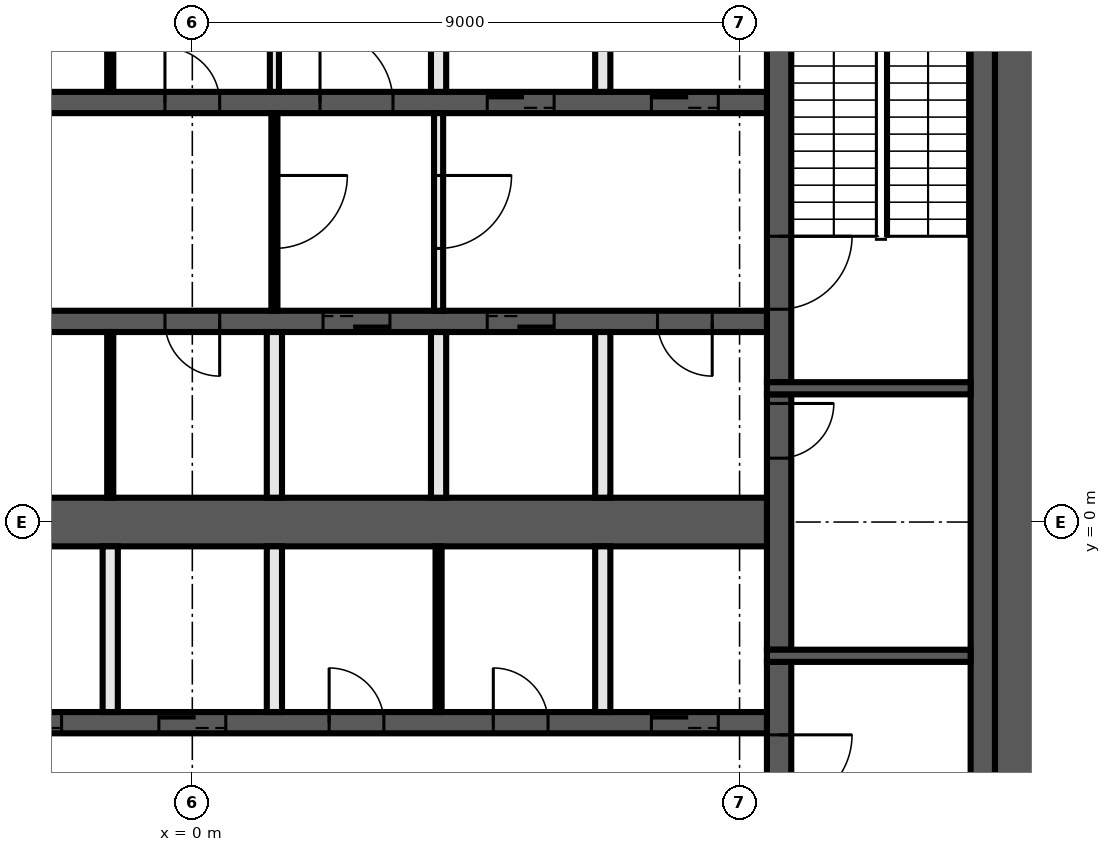
"""IFC4 building model, lengths in metres.
Left out: names, types, materials, properties, quantities, classifications, styles, units other than length and angle.
Written with IfcOpenShell. Run it as: python <this file> out.ifc"""

import sys

from ifc_helpers import new_model, si_unit, direction, frame, frame_2d, origin, place, context, subcontext, project, spatial, rectangle, extrude, element, fill, save


model = new_model("IFC4")
c1 = context("Model", 3, precision=1e-05, world=origin(), true_north=direction((0.0, 1.0)))
c2 = subcontext(c1, "Body", "Model", "MODEL_VIEW")
j1 = project(units=[si_unit("LENGTHUNIT", "METRE"), si_unit("PLANEANGLEUNIT", "RADIAN")], contexts=[c1])
p1 = place(None, origin())
s1 = spatial("IfcSite", under=j1, at=p1, CompositionType="ELEMENT")
p2 = place(p1, origin())
s2 = spatial("IfcBuilding", under=s1, at=p2, CompositionType="ELEMENT")
p3 = place(p2, frame((0.0, 0.0, 175.4)))
s3 = spatial("IfcBuildingStorey", under=s2, at=p3, CompositionType="ELEMENT", Elevation=175.4)
p4 = place(p3, frame((13.6, 10.2, 0.0), z_axis=(0.0, 0.0, 1.0), x_axis=(0.0, -1.0, 0.0)))
e1 = element("IfcWall", 1, at=p4, inside=s3, PredefinedType="SHEAR", context=c2, shape_type="SweptSolid", body=[
    extrude(rectangle(XDim=20.4, YDim=0.8, at=frame_2d((10.2, 0.0))), origin(), (0.0, 0.0, 1.0), 3.82),
])
p5 = place(p3, frame((13.0, 9.8, 0.0), z_axis=(0.0, 0.0, 1.0), x_axis=(0.0, -1.0, 0.0)))
e2 = element("IfcWall", 2, at=p5, inside=s3, PredefinedType="SHEAR", context=c2, shape_type="SweptSolid", body=[
    extrude(rectangle(XDim=19.6, YDim=0.4, at=frame_2d((9.8, 0.0))), origin(), (0.0, 0.0, 1.0), 3.82),
])
p6 = place(p3, frame((9.65, -2.3, 0.0), z_axis=(0.0, 0.0, 1.0), x_axis=(0.0, -1.0, 0.0)))
e3 = element("IfcWall", 3, at=p6, inside=s3, PredefinedType="SHEAR", context=c2, shape_type="SweptSolid", body=[
    extrude(rectangle(XDim=7.5, YDim=0.4, at=frame_2d((3.75, 0.0))), origin(), (0.0, 0.0, 1.0), 3.82),
])
p7 = place(p6, frame((1.2, 0.0, 0.0)))
e4 = element("IfcOpeningElement", 4, at=p7, cuts=e3, PredefinedType="OPENING", context=c2, shape_type="SweptSolid", body=[
    extrude(rectangle(XDim=1.2, YDim=2.1, at=frame_2d((0.6, 1.05))), frame((0.0, 0.21, 0.0), z_axis=(0.0, -1.0, 0.0), x_axis=(1.0, 0.0, 0.0)), (0.0, 0.0, 1.0), 0.42),
])
p8 = place(p3, frame((9.65, 2.1, 0.0), z_axis=(0.0, 0.0, 1.0), x_axis=(0.0, -1.0, 0.0)))
e5 = element("IfcWall", 5, at=p8, inside=s3, PredefinedType="SHEAR", context=c2, shape_type="SweptSolid", body=[
    extrude(rectangle(XDim=4.2, YDim=0.4, at=frame_2d((2.1, 0.0))), origin(), (0.0, 0.0, 1.0), 3.82),
])
p9 = place(p8, frame((0.15, 0.0, 0.0)))
e6 = element("IfcOpeningElement", 6, at=p9, cuts=e5, PredefinedType="OPENING", context=c2, shape_type="SweptSolid", body=[
    extrude(rectangle(XDim=0.9, YDim=2.1, at=frame_2d((0.45, 1.05))), frame((0.0, 0.21, 0.0), z_axis=(0.0, -1.0, 0.0), x_axis=(1.0, 0.0, 0.0)), (0.0, 0.0, 1.0), 0.42),
])
p10 = place(p3, frame((9.65, 9.8, 0.0), z_axis=(0.0, 0.0, 1.0), x_axis=(0.0, -1.0, 0.0)))
e7 = element("IfcWall", 7, at=p10, inside=s3, PredefinedType="SHEAR", context=c2, shape_type="SweptSolid", body=[
    extrude(rectangle(XDim=7.5, YDim=0.4, at=frame_2d((3.75, 0.0))), origin(), (0.0, 0.0, 1.0), 3.82),
])
p11 = place(p10, frame((5.1, 0.0, 0.0)))
e8 = element("IfcOpeningElement", 8, at=p11, cuts=e7, PredefinedType="OPENING", context=c2, shape_type="SweptSolid", body=[
    extrude(rectangle(XDim=1.2, YDim=2.1, at=frame_2d((0.6, 1.05))), frame((0.0, 0.21, 0.0), z_axis=(0.0, -1.0, 0.0), x_axis=(1.0, 0.0, 0.0)), (0.0, 0.0, 1.0), 0.42),
])
for number, where, z_axis, x_axis in (
    (9, (9.45, 2.2, 0.0), (0.0, 0.0, 1.0), (1.0, 0.0, 0.0)),
    (10, (9.45, -2.2, 0.0), (0.0, 0.0, 1.0), (1.0, 0.0, 0.0)),
):
    element("IfcWall", number, at=place(p3, frame(where, z_axis=z_axis, x_axis=x_axis)), inside=s3, PredefinedType="SHEAR", context=c2, shape_type="SweptSolid", body=[
        extrude(rectangle(XDim=3.35, YDim=0.2, at=frame_2d((1.675, 0.0))), origin(), (0.0, 0.0, 1.0), 3.82),
    ])
p12 = place(p3, frame((-9.45, 6.9, 0.0), z_axis=(0.0, 0.0, 1.0), x_axis=(1.0, 0.0, 0.0)))
e11 = element("IfcWall", 11, at=p12, inside=s3, PredefinedType="SHEAR", context=c2, shape_type="SweptSolid", body=[
    extrude(rectangle(XDim=18.9, YDim=0.35, at=frame_2d((9.45, 0.0))), origin(), (0.0, 0.0, 1.0), 3.82),
])
p13 = place(p12, frame((11.55, 0.0, 0.0)))
e12 = element("IfcOpeningElement", 12, at=p13, cuts=e11, PredefinedType="OPENING", context=c2, shape_type="SweptSolid", body=[
    extrude(rectangle(XDim=1.2, YDim=2.1, at=frame_2d((0.6, 1.05))), frame((0.0, 0.185, 0.0), z_axis=(0.0, -1.0, 0.0), x_axis=(1.0, 0.0, 0.0)), (0.0, 0.0, 1.0), 0.37),
])
p14 = place(p12, frame((14.3, 0.0, 0.0)))
e13 = element("IfcOpeningElement", 13, at=p14, cuts=e11, PredefinedType="OPENING", context=c2, shape_type="SweptSolid", body=[
    extrude(rectangle(XDim=1.1, YDim=2.1, at=frame_2d((0.55, 1.05))), frame((0.0, 0.185, 0.0), z_axis=(0.0, -1.0, 0.0), x_axis=(1.0, 0.0, 0.0)), (0.0, 0.0, 1.0), 0.37),
])
p15 = place(p12, frame((17.0, 0.0, 0.0)))
e14 = element("IfcOpeningElement", 14, at=p15, cuts=e11, PredefinedType="OPENING", context=c2, shape_type="SweptSolid", body=[
    extrude(rectangle(XDim=1.1, YDim=2.1, at=frame_2d((0.55, 1.05))), frame((0.0, 0.185, 0.0), z_axis=(0.0, -1.0, 0.0), x_axis=(1.0, 0.0, 0.0)), (0.0, 0.0, 1.0), 0.37),
])
p16 = place(p12, frame((3.6, 0.0, 0.0)))
e15 = element("IfcOpeningElement", 15, at=p16, cuts=e11, PredefinedType="OPENING", context=c2, shape_type="SweptSolid", body=[
    extrude(rectangle(XDim=0.9, YDim=2.1, at=frame_2d((0.45, 1.05))), frame((0.0, 0.185, 0.0), z_axis=(0.0, -1.0, 0.0), x_axis=(1.0, 0.0, 0.0)), (0.0, 0.0, 1.0), 0.37),
])
p17 = place(p12, frame((9.0, 0.0, 0.0)))
e16 = element("IfcOpeningElement", 16, at=p17, cuts=e11, PredefinedType="OPENING", context=c2, shape_type="SweptSolid", body=[
    extrude(rectangle(XDim=0.9, YDim=2.1, at=frame_2d((0.45, 1.05))), frame((0.0, 0.185, 0.0), z_axis=(0.0, -1.0, 0.0), x_axis=(1.0, 0.0, 0.0)), (0.0, 0.0, 1.0), 0.37),
])
p18 = place(p3, frame((9.45, 3.3, 0.0), z_axis=(0.0, 0.0, 1.0), x_axis=(-1.0, 0.0, 0.0)))
e17 = element("IfcWall", 17, at=p18, inside=s3, PredefinedType="SHEAR", context=c2, shape_type="SweptSolid", body=[
    extrude(rectangle(XDim=18.9, YDim=0.35, at=frame_2d((9.45, 0.0))), origin(), (0.0, 0.0, 1.0), 3.82),
])
p19 = place(p18, frame((6.2, 0.0, 0.0)))
e18 = element("IfcOpeningElement", 18, at=p19, cuts=e17, PredefinedType="OPENING", context=c2, shape_type="SweptSolid", body=[
    extrude(rectangle(XDim=1.1, YDim=2.1, at=frame_2d((0.55, 1.05))), frame((0.0, 0.185, 0.0), z_axis=(0.0, -1.0, 0.0), x_axis=(1.0, 0.0, 0.0)), (0.0, 0.0, 1.0), 0.37),
])
p20 = place(p18, frame((3.5, 0.0, 0.0)))
e19 = element("IfcOpeningElement", 19, at=p20, cuts=e17, PredefinedType="OPENING", context=c2, shape_type="SweptSolid", body=[
    extrude(rectangle(XDim=1.1, YDim=2.1, at=frame_2d((0.55, 1.05))), frame((0.0, 0.185, 0.0), z_axis=(0.0, -1.0, 0.0), x_axis=(1.0, 0.0, 0.0)), (0.0, 0.0, 1.0), 0.37),
])
p21 = place(p18, frame((0.9, 0.0, 0.0)))
e20 = element("IfcOpeningElement", 20, at=p21, cuts=e17, PredefinedType="OPENING", context=c2, shape_type="SweptSolid", body=[
    extrude(rectangle(XDim=0.9, YDim=2.1, at=frame_2d((0.45, 1.05))), frame((0.0, 0.185, 0.0), z_axis=(0.0, -1.0, 0.0), x_axis=(1.0, 0.0, 0.0)), (0.0, 0.0, 1.0), 0.37),
])
p22 = place(p18, frame((14.4, 0.0, 0.0)))
e21 = element("IfcOpeningElement", 21, at=p22, cuts=e17, PredefinedType="OPENING", context=c2, shape_type="SweptSolid", body=[
    extrude(rectangle(XDim=0.9, YDim=2.1, at=frame_2d((0.45, 1.05))), frame((0.0, 0.185, 0.0), z_axis=(0.0, -1.0, 0.0), x_axis=(1.0, 0.0, 0.0)), (0.0, 0.0, 1.0), 0.37),
])
p23 = place(p18, frame((9.0, 0.0, 0.0)))
e22 = element("IfcOpeningElement", 22, at=p23, cuts=e17, PredefinedType="OPENING", context=c2, shape_type="SweptSolid", body=[
    extrude(rectangle(XDim=0.9, YDim=2.1, at=frame_2d((0.45, 1.05))), frame((0.0, 0.185, 0.0), z_axis=(0.0, -1.0, 0.0), x_axis=(1.0, 0.0, 0.0)), (0.0, 0.0, 1.0), 0.37),
])
p24 = place(p3, frame((-9.45, -3.3, 0.0), z_axis=(0.0, 0.0, 1.0), x_axis=(1.0, 0.0, 0.0)))
e23 = element("IfcWall", 23, at=p24, inside=s3, PredefinedType="SHEAR", context=c2, shape_type="SweptSolid", body=[
    extrude(rectangle(XDim=18.9, YDim=0.35, at=frame_2d((9.45, 0.0))), origin(), (0.0, 0.0, 1.0), 3.82),
])
p25 = place(p24, frame((0.8, 0.0, 0.0)))
e24 = element("IfcOpeningElement", 24, at=p25, cuts=e23, PredefinedType="OPENING", context=c2, shape_type="SweptSolid", body=[
    extrude(rectangle(XDim=1.1, YDim=2.1, at=frame_2d((0.55, 1.05))), frame((0.0, 0.185, 0.0), z_axis=(0.0, -1.0, 0.0), x_axis=(1.0, 0.0, 0.0)), (0.0, 0.0, 1.0), 0.37),
])
p26 = place(p24, frame((3.5, 0.0, 0.0)))
e25 = element("IfcOpeningElement", 25, at=p26, cuts=e23, PredefinedType="OPENING", context=c2, shape_type="SweptSolid", body=[
    extrude(rectangle(XDim=1.1, YDim=2.1, at=frame_2d((0.55, 1.05))), frame((0.0, 0.185, 0.0), z_axis=(0.0, -1.0, 0.0), x_axis=(1.0, 0.0, 0.0)), (0.0, 0.0, 1.0), 0.37),
])
p27 = place(p24, frame((6.2, 0.0, 0.0)))
e26 = element("IfcOpeningElement", 26, at=p27, cuts=e23, PredefinedType="OPENING", context=c2, shape_type="SweptSolid", body=[
    extrude(rectangle(XDim=1.1, YDim=2.1, at=frame_2d((0.55, 1.05))), frame((0.0, 0.185, 0.0), z_axis=(0.0, -1.0, 0.0), x_axis=(1.0, 0.0, 0.0)), (0.0, 0.0, 1.0), 0.37),
])
p28 = place(p24, frame((8.9, 0.0, 0.0)))
e27 = element("IfcOpeningElement", 27, at=p28, cuts=e23, PredefinedType="OPENING", context=c2, shape_type="SweptSolid", body=[
    extrude(rectangle(XDim=1.1, YDim=2.1, at=frame_2d((0.55, 1.05))), frame((0.0, 0.185, 0.0), z_axis=(0.0, -1.0, 0.0), x_axis=(1.0, 0.0, 0.0)), (0.0, 0.0, 1.0), 0.37),
])
p29 = place(p24, frame((17.0, 0.0, 0.0)))
e28 = element("IfcOpeningElement", 28, at=p29, cuts=e23, PredefinedType="OPENING", context=c2, shape_type="SweptSolid", body=[
    extrude(rectangle(XDim=1.1, YDim=2.1, at=frame_2d((0.55, 1.05))), frame((0.0, 0.185, 0.0), z_axis=(0.0, -1.0, 0.0), x_axis=(1.0, 0.0, 0.0)), (0.0, 0.0, 1.0), 0.37),
])
p30 = place(p24, frame((11.7, 0.0, 0.0)))
e29 = element("IfcOpeningElement", 29, at=p30, cuts=e23, PredefinedType="OPENING", context=c2, shape_type="SweptSolid", body=[
    extrude(rectangle(XDim=0.9, YDim=2.1, at=frame_2d((0.45, 1.05))), frame((0.0, 0.185, 0.0), z_axis=(0.0, -1.0, 0.0), x_axis=(1.0, 0.0, 0.0)), (0.0, 0.0, 1.0), 0.37),
])
p31 = place(p24, frame((14.4, 0.0, 0.0)))
e30 = element("IfcOpeningElement", 30, at=p31, cuts=e23, PredefinedType="OPENING", context=c2, shape_type="SweptSolid", body=[
    extrude(rectangle(XDim=0.9, YDim=2.1, at=frame_2d((0.45, 1.05))), frame((0.0, 0.185, 0.0), z_axis=(0.0, -1.0, 0.0), x_axis=(1.0, 0.0, 0.0)), (0.0, 0.0, 1.0), 0.37),
])
p32 = place(p3, frame((-9.45, 0.0, 0.0), z_axis=(0.0, 0.0, 1.0), x_axis=(1.0, 0.0, 0.0)))
e31 = element("IfcWall", 31, at=p32, inside=s3, PredefinedType="SHEAR", context=c2, shape_type="SweptSolid", body=[
    extrude(rectangle(XDim=18.9, YDim=0.8, at=frame_2d((9.45, 0.0))), origin(), (0.0, 0.0, 1.0), 3.82),
])
for number, where, z_axis, x_axis in (
    (32, (6.75, -3.125, 0.0), (0.0, 0.0, 1.0), (0.0, 1.0, 0.0)),
    (33, (6.75, 0.4, 0.0), (0.0, 0.0, 1.0), (0.0, 1.0, 0.0)),
    (34, (6.75, 7.075, 0.0), (0.0, 0.0, 1.0), (0.0, 1.0, 0.0)),
):
    element("IfcWall", number, at=place(p3, frame(where, z_axis=z_axis, x_axis=x_axis)), inside=s3, PredefinedType="SOLIDWALL", context=c2, shape_type="SweptSolid", body=[
        extrude(rectangle(XDim=2.725, YDim=0.25, at=frame_2d((1.363, 0.0))), origin(), (0.0, 0.0, 1.0), 3.82),
    ])
p33 = place(p3, frame((4.05, 6.725, 0.0), z_axis=(0.0, 0.0, 1.0), x_axis=(0.0, -1.0, 0.0)))
e35 = element("IfcWall", 35, at=p33, inside=s3, PredefinedType="PARTITIONING", context=c2, shape_type="SweptSolid", body=[
    extrude(rectangle(XDim=3.25, YDim=0.15, at=frame_2d((1.625, 0.0))), origin(), (0.0, 0.0, 1.0), 3.82),
])
p34 = place(p33, frame((1.025, 0.0, 0.0)))
e36 = element("IfcOpeningElement", 36, at=p34, cuts=e35, PredefinedType="OPENING", context=c2, shape_type="SweptSolid", body=[
    extrude(rectangle(XDim=1.2, YDim=2.1, at=frame_2d((0.6, 1.05))), frame((0.0, 0.085, 0.0), z_axis=(0.0, -1.0, 0.0), x_axis=(1.0, 0.0, 0.0)), (0.0, 0.0, 1.0), 0.17),
])
p35 = place(p3, frame((4.05, -3.125, 0.0), z_axis=(0.0, 0.0, 1.0), x_axis=(0.0, 1.0, 0.0)))
e37 = element("IfcWall", 37, at=p35, inside=s3, PredefinedType="PARTITIONING", context=c2, shape_type="SweptSolid", body=[
    extrude(rectangle(XDim=2.725, YDim=0.1, at=frame_2d((1.363, 0.0))), origin(), (0.0, 0.0, 1.0), 3.82),
])
for number, where, z_axis, x_axis in (
    (38, (4.05, 0.4, 0.0), (0.0, 0.0, 1.0), (0.0, 1.0, 0.0)),
    (39, (4.05, 7.075, 0.0), (0.0, 0.0, 1.0), (0.0, 1.0, 0.0)),
):
    element("IfcWall", number, at=place(p3, frame(where, z_axis=z_axis, x_axis=x_axis)), inside=s3, PredefinedType="SOLIDWALL", context=c2, shape_type="SweptSolid", body=[
        extrude(rectangle(XDim=2.725, YDim=0.25, at=frame_2d((1.363, 0.0))), origin(), (0.0, 0.0, 1.0), 3.82),
    ])
p36 = place(p3, frame((1.35, 7.075, 0.0), z_axis=(0.0, 0.0, 1.0), x_axis=(0.0, 1.0, 0.0)))
e40 = element("IfcWall", 40, at=p36, inside=s3, PredefinedType="PARTITIONING", context=c2, shape_type="SweptSolid", body=[
    extrude(rectangle(XDim=2.725, YDim=0.15, at=frame_2d((1.363, 0.0))), origin(), (0.0, 0.0, 1.0), 3.82),
])
p37 = place(p3, frame((1.35, 6.725, 0.0), z_axis=(0.0, 0.0, 1.0), x_axis=(0.0, -1.0, 0.0)))
e41 = element("IfcWall", 41, at=p37, inside=s3, PredefinedType="PARTITIONING", context=c2, shape_type="SweptSolid", body=[
    extrude(rectangle(XDim=3.25, YDim=0.1, at=frame_2d((1.625, 0.0))), origin(), (0.0, 0.0, 1.0), 3.82),
])
p38 = place(p37, frame((1.025, 0.0, 0.0)))
e42 = element("IfcOpeningElement", 42, at=p38, cuts=e41, PredefinedType="OPENING", context=c2, shape_type="SweptSolid", body=[
    extrude(rectangle(XDim=1.2, YDim=2.1, at=frame_2d((0.6, 1.05))), frame((0.0, 0.06, 0.0), z_axis=(0.0, -1.0, 0.0), x_axis=(1.0, 0.0, 0.0)), (0.0, 0.0, 1.0), 0.12),
])
for number, where, z_axis, x_axis in (
    (43, (1.35, -3.125, 0.0), (0.0, 0.0, 1.0), (0.0, 1.0, 0.0)),
    (44, (1.35, 0.4, 0.0), (0.0, 0.0, 1.0), (0.0, 1.0, 0.0)),
):
    element("IfcWall", number, at=place(p3, frame(where, z_axis=z_axis, x_axis=x_axis)), inside=s3, PredefinedType="SOLIDWALL", context=c2, shape_type="SweptSolid", body=[
        extrude(rectangle(XDim=2.725, YDim=0.25, at=frame_2d((1.363, 0.0))), origin(), (0.0, 0.0, 1.0), 3.82),
    ])
for number, where, z_axis, x_axis in (
    (45, (-1.35, 0.4, 0.0), (0.0, 0.0, 1.0), (0.0, 1.0, 0.0)),
    (46, (-1.35, 7.075, 0.0), (0.0, 0.0, 1.0), (0.0, 1.0, 0.0)),
):
    element("IfcWall", number, at=place(p3, frame(where, z_axis=z_axis, x_axis=x_axis)), inside=s3, PredefinedType="PARTITIONING", context=c2, shape_type="SweptSolid", body=[
        extrude(rectangle(XDim=2.725, YDim=0.1, at=frame_2d((1.363, 0.0))), origin(), (0.0, 0.0, 1.0), 3.82),
    ])
p39 = place(p3, frame((-1.35, -3.125, 0.0), z_axis=(0.0, 0.0, 1.0), x_axis=(0.0, 1.0, 0.0)))
e47 = element("IfcWall", 47, at=p39, inside=s3, PredefinedType="SOLIDWALL", context=c2, shape_type="SweptSolid", body=[
    extrude(rectangle(XDim=2.725, YDim=0.25, at=frame_2d((1.363, 0.0))), origin(), (0.0, 0.0, 1.0), 3.82),
])
p40 = place(p9, origin())
e48 = element("IfcDoor", 48, at=p40, inside=s3, OperationType="SINGLE_SWING_RIGHT", PredefinedType="DOOR", context=c2, shape_type="SweptSolid", body=[
    extrude(rectangle(XDim=0.9, YDim=2.1, at=frame_2d((0.45, 1.05))), frame((0.0, 0.025, 0.0), z_axis=(0.0, -1.0, 0.0), x_axis=(1.0, 0.0, 0.0)), (0.0, 0.0, 1.0), 0.05),
])
fill(e6, e48)
p41 = place(p13, origin())
e49 = element("IfcDoor", 49, at=p41, inside=s3, OperationType="SINGLE_SWING_LEFT", PredefinedType="DOOR", context=c2, shape_type="SweptSolid", body=[
    extrude(rectangle(XDim=1.2, YDim=2.1, at=frame_2d((0.6, 1.05))), frame((0.0, 0.025, 0.0), z_axis=(0.0, -1.0, 0.0), x_axis=(1.0, 0.0, 0.0)), (0.0, 0.0, 1.0), 0.05),
])
fill(e12, e49)
p42 = place(p14, origin())
e50 = element("IfcDoor", 50, at=p42, inside=s3, OperationType="DOUBLE_DOOR_SLIDING", PredefinedType="DOOR", context=c2, shape_type="SweptSolid", body=[
    extrude(rectangle(XDim=1.1, YDim=2.1, at=frame_2d((0.55, 1.05))), frame((0.0, 0.025, 0.0), z_axis=(0.0, -1.0, 0.0), x_axis=(1.0, 0.0, 0.0)), (0.0, 0.0, 1.0), 0.05),
])
fill(e13, e50)
p43 = place(p15, origin())
e51 = element("IfcDoor", 51, at=p43, inside=s3, OperationType="DOUBLE_DOOR_SLIDING", PredefinedType="DOOR", context=c2, shape_type="SweptSolid", body=[
    extrude(rectangle(XDim=1.1, YDim=2.1, at=frame_2d((0.55, 1.05))), frame((0.0, 0.025, 0.0), z_axis=(0.0, -1.0, 0.0), x_axis=(1.0, 0.0, 0.0)), (0.0, 0.0, 1.0), 0.05),
])
fill(e14, e51)
p44 = place(p19, origin())
e52 = element("IfcDoor", 52, at=p44, inside=s3, OperationType="DOUBLE_DOOR_SLIDING", PredefinedType="DOOR", context=c2, shape_type="SweptSolid", body=[
    extrude(rectangle(XDim=1.1, YDim=2.1, at=frame_2d((0.55, 1.05))), frame((0.0, 0.025, 0.0), z_axis=(0.0, -1.0, 0.0), x_axis=(1.0, 0.0, 0.0)), (0.0, 0.0, 1.0), 0.05),
])
fill(e18, e52)
p45 = place(p20, origin())
e53 = element("IfcDoor", 53, at=p45, inside=s3, OperationType="DOUBLE_DOOR_SLIDING", PredefinedType="DOOR", context=c2, shape_type="SweptSolid", body=[
    extrude(rectangle(XDim=1.1, YDim=2.1, at=frame_2d((0.55, 1.05))), frame((0.0, 0.025, 0.0), z_axis=(0.0, -1.0, 0.0), x_axis=(1.0, 0.0, 0.0)), (0.0, 0.0, 1.0), 0.05),
])
fill(e19, e53)
p46 = place(p21, origin())
e54 = element("IfcDoor", 54, at=p46, inside=s3, OperationType="SINGLE_SWING_LEFT", PredefinedType="DOOR", context=c2, shape_type="SweptSolid", body=[
    extrude(rectangle(XDim=0.9, YDim=2.1, at=frame_2d((0.45, 1.05))), frame((0.0, 0.025, 0.0), z_axis=(0.0, -1.0, 0.0), x_axis=(1.0, 0.0, 0.0)), (0.0, 0.0, 1.0), 0.05),
])
fill(e20, e54)
p47 = place(p27, origin())
e55 = element("IfcDoor", 55, at=p47, inside=s3, OperationType="DOUBLE_DOOR_SLIDING", PredefinedType="DOOR", context=c2, shape_type="SweptSolid", body=[
    extrude(rectangle(XDim=1.1, YDim=2.1, at=frame_2d((0.55, 1.05))), frame((0.0, 0.025, 0.0), z_axis=(0.0, -1.0, 0.0), x_axis=(1.0, 0.0, 0.0)), (0.0, 0.0, 1.0), 0.05),
])
fill(e26, e55)
p48 = place(p28, origin())
e56 = element("IfcDoor", 56, at=p48, inside=s3, OperationType="DOUBLE_DOOR_SLIDING", PredefinedType="DOOR", context=c2, shape_type="SweptSolid", body=[
    extrude(rectangle(XDim=1.1, YDim=2.1, at=frame_2d((0.55, 1.05))), frame((0.0, 0.025, 0.0), z_axis=(0.0, -1.0, 0.0), x_axis=(1.0, 0.0, 0.0)), (0.0, 0.0, 1.0), 0.05),
])
fill(e27, e56)
p49 = place(p29, origin())
e57 = element("IfcDoor", 57, at=p49, inside=s3, OperationType="DOUBLE_DOOR_SLIDING", PredefinedType="DOOR", context=c2, shape_type="SweptSolid", body=[
    extrude(rectangle(XDim=1.1, YDim=2.1, at=frame_2d((0.55, 1.05))), frame((0.0, 0.025, 0.0), z_axis=(0.0, -1.0, 0.0), x_axis=(1.0, 0.0, 0.0)), (0.0, 0.0, 1.0), 0.05),
])
fill(e28, e57)
p50 = place(p17, origin())
e58 = element("IfcDoor", 58, at=p50, inside=s3, OperationType="SINGLE_SWING_LEFT", PredefinedType="DOOR", context=c2, shape_type="SweptSolid", body=[
    extrude(rectangle(XDim=0.9, YDim=2.1, at=frame_2d((0.45, 1.05))), frame((0.0, 0.025, 0.0), z_axis=(0.0, -1.0, 0.0), x_axis=(1.0, 0.0, 0.0)), (0.0, 0.0, 1.0), 0.05),
])
fill(e16, e58)
p51 = place(p23, origin())
e59 = element("IfcDoor", 59, at=p51, inside=s3, OperationType="SINGLE_SWING_LEFT", PredefinedType="DOOR", context=c2, shape_type="SweptSolid", body=[
    extrude(rectangle(XDim=0.9, YDim=2.1, at=frame_2d((0.45, 1.05))), frame((0.0, 0.025, 0.0), z_axis=(0.0, -1.0, 0.0), x_axis=(1.0, 0.0, 0.0)), (0.0, 0.0, 1.0), 0.05),
])
fill(e22, e59)
p52 = place(p30, origin())
e60 = element("IfcDoor", 60, at=p52, inside=s3, OperationType="SINGLE_SWING_RIGHT", PredefinedType="DOOR", context=c2, shape_type="SweptSolid", body=[
    extrude(rectangle(XDim=0.9, YDim=2.1, at=frame_2d((0.45, 1.05))), frame((0.0, 0.025, 0.0), z_axis=(0.0, -1.0, 0.0), x_axis=(1.0, 0.0, 0.0)), (0.0, 0.0, 1.0), 0.05),
])
fill(e29, e60)
p53 = place(p31, origin())
e61 = element("IfcDoor", 61, at=p53, inside=s3, OperationType="SINGLE_SWING_LEFT", PredefinedType="DOOR", context=c2, shape_type="SweptSolid", body=[
    extrude(rectangle(XDim=0.9, YDim=2.1, at=frame_2d((0.45, 1.05))), frame((0.0, 0.025, 0.0), z_axis=(0.0, -1.0, 0.0), x_axis=(1.0, 0.0, 0.0)), (0.0, 0.0, 1.0), 0.05),
])
fill(e30, e61)
p54 = place(p11, origin())
e62 = element("IfcDoor", 62, at=p54, inside=s3, OperationType="SINGLE_SWING_LEFT", PredefinedType="DOOR", context=c2, shape_type="SweptSolid", body=[
    extrude(rectangle(XDim=1.2, YDim=2.1, at=frame_2d((0.6, 1.05))), frame((0.0, 0.025, 0.0), z_axis=(0.0, -1.0, 0.0), x_axis=(1.0, 0.0, 0.0)), (0.0, 0.0, 1.0), 0.05),
])
fill(e8, e62)
p55 = place(p7, origin())
e63 = element("IfcDoor", 63, at=p55, inside=s3, OperationType="SINGLE_SWING_RIGHT", PredefinedType="DOOR", context=c2, shape_type="SweptSolid", body=[
    extrude(rectangle(XDim=1.2, YDim=2.1, at=frame_2d((0.6, 1.05))), frame((0.0, 0.025, 0.0), z_axis=(0.0, -1.0, 0.0), x_axis=(1.0, 0.0, 0.0)), (0.0, 0.0, 1.0), 0.05),
])
fill(e4, e63)
p56 = place(p38, origin())
e64 = element("IfcDoor", 64, at=p56, inside=s3, OperationType="SINGLE_SWING_LEFT", PredefinedType="DOOR", context=c2, shape_type="SweptSolid", body=[
    extrude(rectangle(XDim=1.2, YDim=2.1, at=frame_2d((0.6, 1.05))), frame((0.0, 0.025, 0.0), z_axis=(0.0, -1.0, 0.0), x_axis=(1.0, 0.0, 0.0)), (0.0, 0.0, 1.0), 0.05),
])
fill(e42, e64)
p57 = place(p34, origin())
e65 = element("IfcDoor", 65, at=p57, inside=s3, OperationType="SINGLE_SWING_RIGHT", PredefinedType="DOOR", context=c2, shape_type="SweptSolid", body=[
    extrude(rectangle(XDim=1.2, YDim=2.1, at=frame_2d((0.6, 1.05))), frame((0.0, 0.025, 0.0), z_axis=(0.0, -1.0, 0.0), x_axis=(1.0, 0.0, 0.0)), (0.0, 0.0, 1.0), 0.05),
])
fill(e36, e65)
save(model, sys.argv[1])
